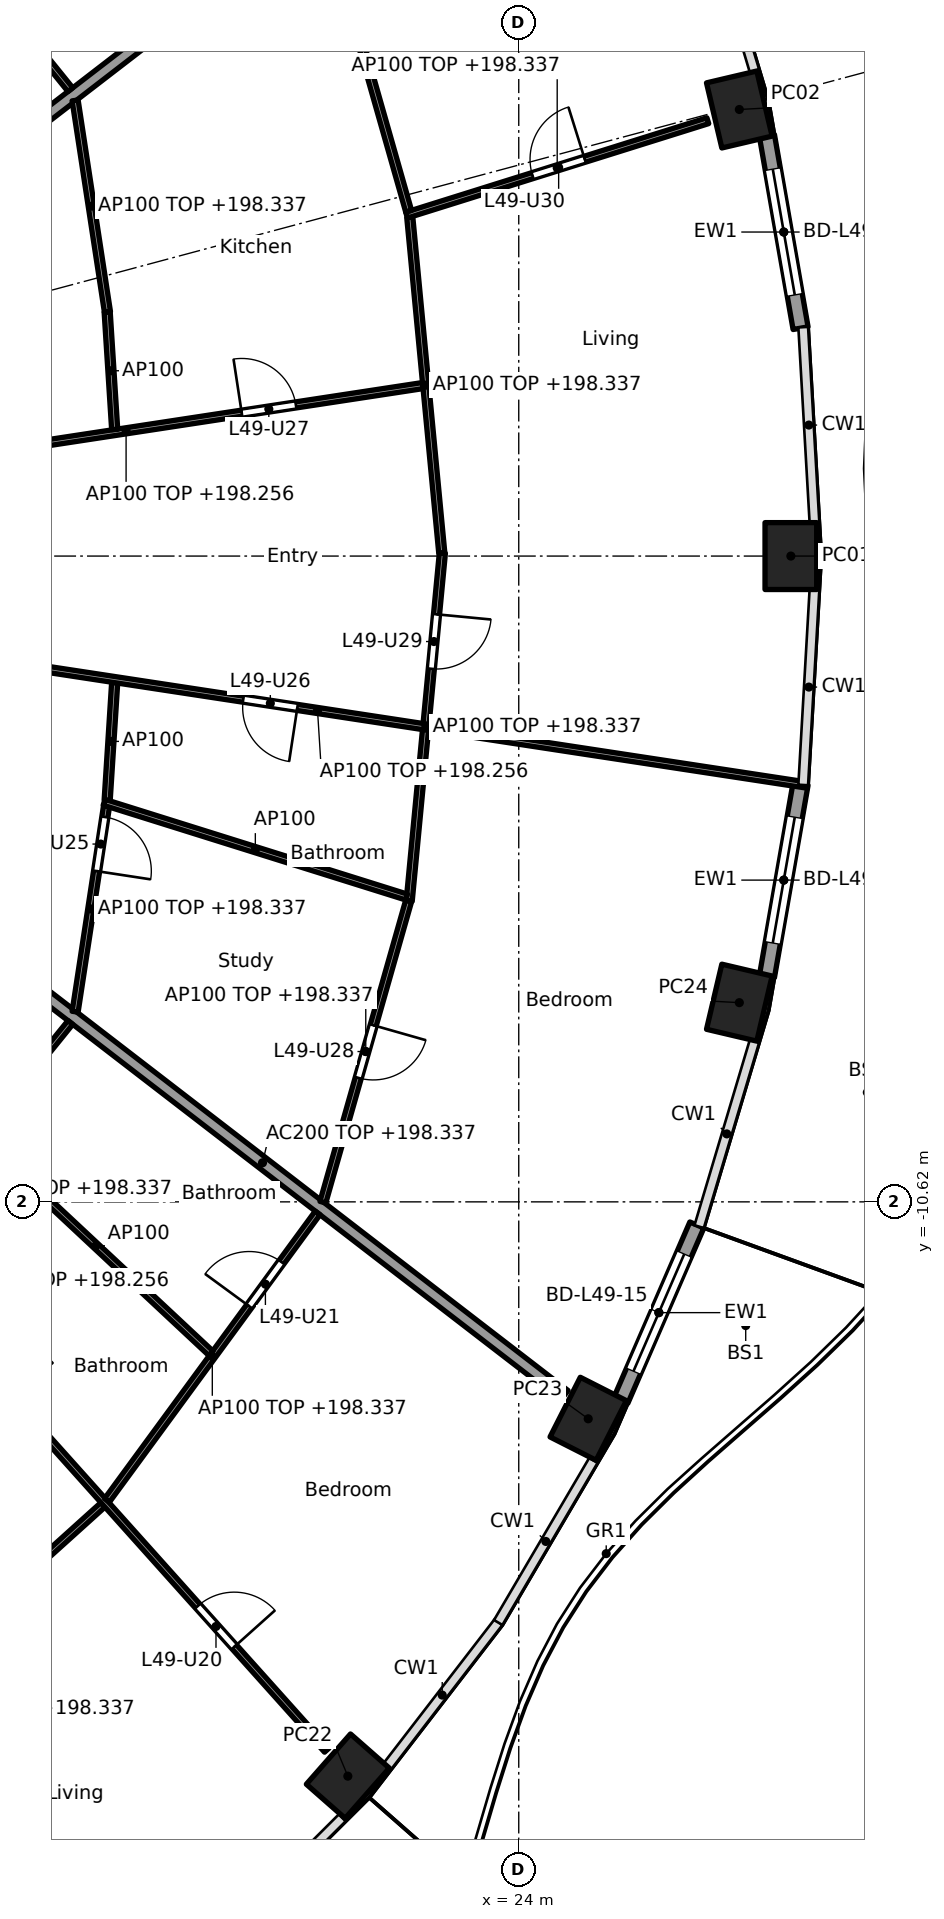
"""IFC4 building model, lengths in metres.
Left out: names, types, materials, properties, quantities, classifications, styles, units other than length and angle.
Written with IfcOpenShell. Run it as: python <this file> out.ifc"""

import sys

from ifc_helpers import new_model, si_unit, direction, frame, frame_2d, origin, origin_2d, place, context, subcontext, project, spatial, rectangle, hollow_rectangle, extrude, element, fill, save


model = new_model("IFC4")
c1 = context("Model", 3, precision=1e-05, world=origin(), true_north=direction((0.0, 1.0)))
c2 = subcontext(c1, "Body", "Model", "MODEL_VIEW")
j1 = project(units=[si_unit("LENGTHUNIT", "METRE"), si_unit("PLANEANGLEUNIT", "RADIAN")], contexts=[c1])
p1 = place(None, origin())
s1 = spatial("IfcSite", under=j1, at=p1, CompositionType="ELEMENT")
p2 = place(p1, origin())
s2 = spatial("IfcBuilding", under=s1, at=p2, CompositionType="ELEMENT")
p3 = place(p2, frame((0.0, 0.0, 195.5)))
s3 = spatial("IfcBuildingStorey", under=s2, at=p3, CompositionType="ELEMENT", Elevation=195.5)
for number, where, z_axis, x_axis in (
    (1, (28.475, 0.0, 0.0), (0.0, 0.0, 1.0), (0.0, 1.0, 0.0)),
    (2, (27.627, 7.344, 0.0), (0.0, 0.0, 1.0), (-0.229, 0.973, 0.0)),
    (3, (21.189, -20.064, 0.0), (0.0, 0.0, 1.0), (0.66, 0.751, 0.0)),
    (4, (25.142, -14.188, 0.0), (0.0, 0.0, 1.0), (0.452, 0.892, 0.0)),
    (5, (27.627, -7.344, 0.0), (0.0, 0.0, 1.0), (0.229, 0.973, 0.0)),
):
    element("IfcColumn", number, at=place(p3, frame(where, z_axis=z_axis, x_axis=x_axis)), inside=s3, PredefinedType="COLUMN", context=c2, shape_type="SweptSolid", body=[
        extrude(hollow_rectangle(XDim=1.1, YDim=0.85, WallThickness=0.036, at=origin_2d()), origin(), (0.0, 0.0, 1.0), 3.7),
    ])
p4 = place(p3, frame((28.082, 6.91, 0.0), z_axis=(0.0, 0.0, 1.0), x_axis=(0.172149769468, -0.985070787747, 0.0)))
e6 = element("IfcWall", 6, at=p4, inside=s3, PredefinedType="SOLIDWALL", context=c2, shape_type="SweptSolid", body=[
    extrude(rectangle(XDim=3.211, YDim=0.25, at=frame_2d((1.605, 0.0))), origin(), (0.0, 0.0, 1.0), 3.44),
])
p5 = place(p4, frame((0.555, 0.0, 0.0)))
e7 = element("IfcOpeningElement", 7, at=p5, cuts=e6, PredefinedType="OPENING", context=c2, shape_type="SweptSolid", body=[
    extrude(rectangle(XDim=2.1, YDim=2.4, at=frame_2d((1.05, 1.2))), frame((0.0, 0.135, 0.0), z_axis=(0.0, -1.0, 0.0), x_axis=(1.0, 0.0, 0.0)), (0.0, 0.0, 1.0), 0.27),
])
p6 = place(p3, frame((26.929, -11.0, 0.0), z_axis=(0.0, 0.0, 1.0), x_axis=(-0.397620521824, -0.917549955384, 0.0)))
e8 = element("IfcWall", 8, at=p6, inside=s3, PredefinedType="SOLIDWALL", context=c2, shape_type="SweptSolid", body=[
    extrude(rectangle(XDim=3.142, YDim=0.25, at=frame_2d((1.571, 0.0))), origin(), (0.0, 0.0, 1.0), 3.44),
])
p7 = place(p6, frame((0.521, 0.0, 0.0)))
e9 = element("IfcOpeningElement", 9, at=p7, cuts=e8, PredefinedType="OPENING", context=c2, shape_type="SweptSolid", body=[
    extrude(rectangle(XDim=2.1, YDim=2.4, at=frame_2d((1.05, 1.2))), frame((0.0, 0.135, 0.0), z_axis=(0.0, -1.0, 0.0), x_axis=(1.0, 0.0, 0.0)), (0.0, 0.0, 1.0), 0.27),
])
p8 = place(p3, frame((28.635, -3.747, 0.0), z_axis=(0.0, 0.0, 1.0), x_axis=(-0.172149769468, -0.985070787747, 0.0)))
e10 = element("IfcWall", 10, at=p8, inside=s3, PredefinedType="SOLIDWALL", context=c2, shape_type="SweptSolid", body=[
    extrude(rectangle(XDim=3.211, YDim=0.25, at=frame_2d((1.605, 0.0))), origin(), (0.0, 0.0, 1.0), 3.44),
])
p9 = place(p8, frame((0.555, 0.0, 0.0)))
e11 = element("IfcOpeningElement", 11, at=p9, cuts=e10, PredefinedType="OPENING", context=c2, shape_type="SweptSolid", body=[
    extrude(rectangle(XDim=2.1, YDim=2.4, at=frame_2d((1.05, 1.2))), frame((0.0, 0.135, 0.0), z_axis=(0.0, -1.0, 0.0), x_axis=(1.0, 0.0, 0.0)), (0.0, 0.0, 1.0), 0.27),
])
for number, where, z_axis, x_axis in (
    (12, (14.822, 6.154, 0.0), (0.0, 0.0, 1.0), (0.792, 0.61, 0.0)),
    (13, (14.822, -6.154, 0.0), (0.0, 0.0, 1.0), (0.792, -0.61, 0.0)),
):
    element("IfcWall", number, at=place(p3, frame(where, z_axis=z_axis, x_axis=x_axis)), inside=s3, PredefinedType="PARTITIONING", context=c2, shape_type="SweptSolid", body=[
        extrude(rectangle(XDim=12.533, YDim=0.2, at=frame_2d((6.266, 0.0))), origin(), (0.0, 0.0, 1.0), 2.837),
    ])
p10 = place(p3, frame((22.734, 0.05, 0.0), z_axis=(0.0, 0.0, 1.0), x_axis=(-0.094923312677, 0.995484587882, 0.0)))
e14 = element("IfcWall", 14, at=p10, inside=s3, PredefinedType="PARTITIONING", context=c2, shape_type="SweptSolid", body=[
    extrude(rectangle(XDim=5.548, YDim=0.1, at=frame_2d((2.774, 0.0))), origin(), (0.0, 0.0, 1.0), 2.837),
])
p11 = place(p3, frame((22.744, 0.05, 0.0), z_axis=(0.0, 0.0, 1.0), x_axis=(-0.094931362305, -0.995483820286, 0.0)))
e15 = element("IfcWall", 15, at=p11, inside=s3, PredefinedType="PARTITIONING", context=c2, shape_type="SweptSolid", body=[
    extrude(rectangle(XDim=5.748, YDim=0.1, at=frame_2d((2.874, 0.0))), origin(), (0.0, 0.0, 1.0), 2.837),
])
p12 = place(p11, frame((1.012, 0.0, 0.0)))
e16 = element("IfcOpeningElement", 16, at=p12, cuts=e15, PredefinedType="OPENING", context=c2, shape_type="SweptSolid", body=[
    extrude(rectangle(XDim=0.9, YDim=2.1, at=frame_2d((0.45, 1.05))), frame((0.0, 0.06, 0.0), z_axis=(0.0, -1.0, 0.0), x_axis=(1.0, 0.0, 0.0)), (0.0, 0.0, 1.0), 0.12),
])
p13 = place(p3, frame((12.664, 1.316, 0.0), z_axis=(0.0, 0.0, 1.0), x_axis=(0.988579217853, 0.150702123505, 0.0)))
e17 = element("IfcWall", 17, at=p13, inside=s3, PredefinedType="PARTITIONING", context=c2, shape_type="SweptSolid", body=[
    extrude(rectangle(XDim=9.871, YDim=0.1, at=frame_2d((4.936, 0.0))), origin(), (0.0, 0.0, 1.0), 2.756),
])
p14 = place(p13, frame((1.924, 0.0, 0.0)))
e18 = element("IfcOpeningElement", 18, at=p14, cuts=e17, PredefinedType="OPENING", context=c2, shape_type="SweptSolid", body=[
    extrude(rectangle(XDim=0.9, YDim=2.1, at=frame_2d((0.45, 1.05))), frame((0.0, 0.06, 0.0), z_axis=(0.0, -1.0, 0.0), x_axis=(1.0, 0.0, 0.0)), (0.0, 0.0, 1.0), 0.12),
])
p15 = place(p13, frame((6.86, 0.0, 0.0)))
e19 = element("IfcOpeningElement", 19, at=p15, cuts=e17, PredefinedType="OPENING", context=c2, shape_type="SweptSolid", body=[
    extrude(rectangle(XDim=0.9, YDim=2.1, at=frame_2d((0.45, 1.05))), frame((0.0, 0.06, 0.0), z_axis=(0.0, -1.0, 0.0), x_axis=(1.0, 0.0, 0.0)), (0.0, 0.0, 1.0), 0.12),
])
p16 = place(p3, frame((17.355, 2.082, 0.0), z_axis=(0.0, 0.0, 1.0), x_axis=(-0.063689464349, 0.997969765139, 0.0)))
e20 = element("IfcWall", 20, at=p16, inside=s3, PredefinedType="PARTITIONING", context=c2, shape_type="SweptSolid", body=[
    extrude(rectangle(XDim=1.936, YDim=0.1, at=frame_2d((0.968, 0.0))), origin(), (0.0, 0.0, 1.0), 3.44),
])
p17 = place(p3, frame((17.236, 4.014, 0.0), z_axis=(0.0, 0.0, 1.0), x_axis=(-0.151087537093, 0.988520387314, 0.0)))
e21 = element("IfcWall", 21, at=p17, inside=s3, PredefinedType="PARTITIONING", context=c2, shape_type="SweptSolid", body=[
    extrude(rectangle(XDim=3.519, YDim=0.1, at=frame_2d((1.76, 0.0))), origin(), (0.0, 0.0, 1.0), 2.837),
])
p18 = place(p3, frame((22.155, 5.607, 0.0), z_axis=(0.0, 0.0, 1.0), x_axis=(0.954251251005, 0.299005936321, 0.0)))
e22 = element("IfcWall", 22, at=p18, inside=s3, PredefinedType="PARTITIONING", context=c2, shape_type="SweptSolid", body=[
    extrude(rectangle(XDim=5.191, YDim=0.1, at=frame_2d((2.596, 0.0))), origin(), (0.0, 0.0, 1.0), 2.837),
])
p19 = place(p18, frame((2.171, 0.0, 0.0)))
e23 = element("IfcOpeningElement", 23, at=p19, cuts=e22, PredefinedType="OPENING", context=c2, shape_type="SweptSolid", body=[
    extrude(rectangle(XDim=0.9, YDim=2.1, at=frame_2d((0.45, 1.05))), frame((0.0, 0.06, 0.0), z_axis=(0.0, -1.0, 0.0), x_axis=(1.0, 0.0, 0.0)), (0.0, 0.0, 1.0), 0.12),
])
p20 = place(p3, frame((22.189, 5.67, 0.0), z_axis=(0.0, 0.0, 1.0), x_axis=(-0.273819702124, 0.961781040949, 0.0)))
e24 = element("IfcWall", 24, at=p20, inside=s3, PredefinedType="PARTITIONING", context=c2, shape_type="SweptSolid", body=[
    extrude(rectangle(XDim=5.152, YDim=0.1, at=frame_2d((2.576, 0.0))), origin(), (0.0, 0.0, 1.0), 2.837),
])
p21 = place(p3, frame((16.626, 7.67, 0.0), z_axis=(0.0, 0.0, 1.0), x_axis=(-0.628764602857, 0.777595700987, 0.0)))
e25 = element("IfcWall", 25, at=p21, inside=s3, PredefinedType="PARTITIONING", context=c2, shape_type="SweptSolid", body=[
    extrude(rectangle(XDim=4.957, YDim=0.1, at=frame_2d((2.479, 0.0))), origin(), (0.0, 0.0, 1.0), 2.837),
])
p22 = place(p3, frame((13.045, -19.313, 0.0), z_axis=(0.0, 0.0, 1.0), x_axis=(0.742790086539, 0.66952437397, 0.0)))
e26 = element("IfcWall", 26, at=p22, inside=s3, PredefinedType="PARTITIONING", context=c2, shape_type="SweptSolid", body=[
    extrude(rectangle(XDim=5.542, YDim=0.1, at=frame_2d((2.771, 0.0))), origin(), (0.0, 0.0, 1.0), 2.837),
])
p23 = place(p22, frame((2.321, 0.0, 0.0)))
e27 = element("IfcOpeningElement", 27, at=p23, cuts=e26, PredefinedType="OPENING", context=c2, shape_type="SweptSolid", body=[
    extrude(rectangle(XDim=0.9, YDim=2.1, at=frame_2d((0.45, 1.05))), frame((0.0, 0.06, 0.0), z_axis=(0.0, -1.0, 0.0), x_axis=(1.0, 0.0, 0.0)), (0.0, 0.0, 1.0), 0.12),
])
p24 = place(p3, frame((10.178, -7.732, 0.0), z_axis=(0.0, 0.0, 1.0), x_axis=(0.667283629999, -0.74480370376, 0.0)))
e28 = element("IfcWall", 28, at=p24, inside=s3, PredefinedType="PARTITIONING", context=c2, shape_type="SweptSolid", body=[
    extrude(rectangle(XDim=15.983, YDim=0.1, at=frame_2d((7.992, 0.0))), origin(), (0.0, 0.0, 1.0), 2.756),
])
p25 = place(p24, frame((2.07, 0.0, 0.0)))
e29 = element("IfcOpeningElement", 29, at=p25, cuts=e28, PredefinedType="OPENING", context=c2, shape_type="SweptSolid", body=[
    extrude(rectangle(XDim=0.9, YDim=2.1, at=frame_2d((0.45, 1.05))), frame((0.0, 0.06, 0.0), z_axis=(0.0, -1.0, 0.0), x_axis=(1.0, 0.0, 0.0)), (0.0, 0.0, 1.0), 0.12),
])
p26 = place(p24, frame((7.331, 0.0, 0.0)))
e30 = element("IfcOpeningElement", 30, at=p26, cuts=e28, PredefinedType="OPENING", context=c2, shape_type="SweptSolid", body=[
    extrude(rectangle(XDim=0.9, YDim=2.1, at=frame_2d((0.45, 1.05))), frame((0.0, 0.06, 0.0), z_axis=(0.0, -1.0, 0.0), x_axis=(1.0, 0.0, 0.0)), (0.0, 0.0, 1.0), 0.12),
])
p27 = place(p24, frame((12.802, 0.0, 0.0)))
e31 = element("IfcOpeningElement", 31, at=p27, cuts=e28, PredefinedType="OPENING", context=c2, shape_type="SweptSolid", body=[
    extrude(rectangle(XDim=0.9, YDim=2.1, at=frame_2d((0.45, 1.05))), frame((0.0, 0.06, 0.0), z_axis=(0.0, -1.0, 0.0), x_axis=(1.0, 0.0, 0.0)), (0.0, 0.0, 1.0), 0.12),
])
p28 = place(p3, frame((13.572, -11.447, 0.0), z_axis=(0.0, 0.0, 1.0), x_axis=(0.628738316533, 0.777616955399, 0.0)))
e32 = element("IfcWall", 32, at=p28, inside=s3, PredefinedType="PARTITIONING", context=c2, shape_type="SweptSolid", body=[
    extrude(rectangle(XDim=4.857, YDim=0.1, at=frame_2d((2.429, 0.0))), origin(), (0.0, 0.0, 1.0), 2.837),
])
p29 = place(p3, frame((17.229, -15.529, 0.0), z_axis=(0.0, 0.0, 1.0), x_axis=(0.591110768293, 0.806590391468, 0.0)))
e33 = element("IfcWall", 33, at=p29, inside=s3, PredefinedType="PARTITIONING", context=c2, shape_type="SweptSolid", body=[
    extrude(rectangle(XDim=5.86, YDim=0.1, at=frame_2d((2.93, 0.0))), origin(), (0.0, 0.0, 1.0), 2.837),
])
p30 = place(p29, frame((3.958, 0.0, 0.0)))
e34 = element("IfcOpeningElement", 34, at=p30, cuts=e33, PredefinedType="OPENING", context=c2, shape_type="SweptSolid", body=[
    extrude(rectangle(XDim=0.9, YDim=2.1, at=frame_2d((0.45, 1.05))), frame((0.0, 0.06, 0.0), z_axis=(0.0, -1.0, 0.0), x_axis=(1.0, 0.0, 0.0)), (0.0, 0.0, 1.0), 0.12),
])
p31 = place(p3, frame((15.152, -9.573, 0.0), z_axis=(0.0, 0.0, 1.0), x_axis=(0.730723083214, -0.682673989294, 0.0)))
e35 = element("IfcWall", 35, at=p31, inside=s3, PredefinedType="PARTITIONING", context=c2, shape_type="SweptSolid", body=[
    extrude(rectangle(XDim=5.183, YDim=0.1, at=frame_2d((2.591, 0.0))), origin(), (0.0, 0.0, 1.0), 3.44),
])
p32 = place(p3, frame((16.704, -7.493, 0.0), z_axis=(0.0, 0.0, 1.0), x_axis=(0.1510806336, 0.988521442434, 0.0)))
e36 = element("IfcWall", 36, at=p32, inside=s3, PredefinedType="PARTITIONING", context=c2, shape_type="SweptSolid", body=[
    extrude(rectangle(XDim=3.419, YDim=0.1, at=frame_2d((1.71, 0.0))), origin(), (0.0, 0.0, 1.0), 2.837),
])
p33 = place(p32, frame((2.339, 0.0, 0.0)))
e37 = element("IfcOpeningElement", 37, at=p33, cuts=e36, PredefinedType="OPENING", context=c2, shape_type="SweptSolid", body=[
    extrude(rectangle(XDim=0.9, YDim=2.1, at=frame_2d((0.45, 1.05))), frame((0.0, 0.06, 0.0), z_axis=(0.0, -1.0, 0.0), x_axis=(1.0, 0.0, 0.0)), (0.0, 0.0, 1.0), 0.12),
])
p34 = place(p3, frame((20.779, -10.625, 0.0), z_axis=(0.0, 0.0, 1.0), x_axis=(0.273819702124, 0.961781040949, 0.0)))
e38 = element("IfcWall", 38, at=p34, inside=s3, PredefinedType="PARTITIONING", context=c2, shape_type="SweptSolid", body=[
    extrude(rectangle(XDim=5.152, YDim=0.1, at=frame_2d((2.576, 0.0))), origin(), (0.0, 0.0, 1.0), 2.837),
])
p35 = place(p34, frame((2.126, 0.0, 0.0)))
e39 = element("IfcOpeningElement", 39, at=p35, cuts=e38, PredefinedType="OPENING", context=c2, shape_type="SweptSolid", body=[
    extrude(rectangle(XDim=0.9, YDim=2.1, at=frame_2d((0.45, 1.05))), frame((0.0, 0.06, 0.0), z_axis=(0.0, -1.0, 0.0), x_axis=(1.0, 0.0, 0.0)), (0.0, 0.0, 1.0), 0.12),
])
p36 = place(p3, frame((17.181, -4.049, 0.0), z_axis=(0.0, 0.0, 1.0), x_axis=(0.954246359918, -0.299021545351, 0.0)))
e40 = element("IfcWall", 40, at=p36, inside=s3, PredefinedType="PARTITIONING", context=c2, shape_type="SweptSolid", body=[
    extrude(rectangle(XDim=5.213, YDim=0.1, at=frame_2d((2.606, 0.0))), origin(), (0.0, 0.0, 1.0), 3.44),
])
p37 = place(p3, frame((17.232, -4.014, 0.0), z_axis=(0.0, 0.0, 1.0), x_axis=(0.063689464349, 0.997969765139, 0.0)))
e41 = element("IfcWall", 41, at=p37, inside=s3, PredefinedType="PARTITIONING", context=c2, shape_type="SweptSolid", body=[
    extrude(rectangle(XDim=1.936, YDim=0.1, at=frame_2d((0.968, 0.0))), origin(), (0.0, 0.0, 1.0), 3.44),
])
p38 = place(p3, frame((12.664, -1.316, 0.0), z_axis=(0.0, 0.0, 1.0), x_axis=(0.988585177081, -0.150663026836, 0.0)))
e42 = element("IfcWall", 42, at=p38, inside=s3, PredefinedType="PARTITIONING", context=c2, shape_type="SweptSolid", body=[
    extrude(rectangle(XDim=16.24, YDim=0.1, at=frame_2d((8.12, 0.0))), origin(), (0.0, 0.0, 1.0), 2.756),
])
p39 = place(p38, frame((1.924, 0.0, 0.0)))
e43 = element("IfcOpeningElement", 43, at=p39, cuts=e42, PredefinedType="OPENING", context=c2, shape_type="SweptSolid", body=[
    extrude(rectangle(XDim=0.9, YDim=2.1, at=frame_2d((0.45, 1.05))), frame((0.0, 0.06, 0.0), z_axis=(0.0, -1.0, 0.0), x_axis=(1.0, 0.0, 0.0)), (0.0, 0.0, 1.0), 0.12),
])
p40 = place(p38, frame((6.885, 0.0, 0.0)))
e44 = element("IfcOpeningElement", 44, at=p40, cuts=e42, PredefinedType="OPENING", context=c2, shape_type="SweptSolid", body=[
    extrude(rectangle(XDim=0.9, YDim=2.1, at=frame_2d((0.45, 1.05))), frame((0.0, 0.06, 0.0), z_axis=(0.0, -1.0, 0.0), x_axis=(1.0, 0.0, 0.0)), (0.0, 0.0, 1.0), 0.12),
])
p41 = place(p5, origin())
e45 = element("IfcDoor", 45, at=p41, inside=s3, OperationType="SLIDING_TO_LEFT", PredefinedType="DOOR", context=c2, shape_type="SweptSolid", body=[
    extrude(rectangle(XDim=2.1, YDim=2.4, at=frame_2d((1.05, 1.2))), frame((0.0, 0.025, 0.0), z_axis=(0.0, -1.0, 0.0), x_axis=(1.0, 0.0, 0.0)), (0.0, 0.0, 1.0), 0.05),
])
fill(e7, e45)
p42 = place(p7, origin())
e46 = element("IfcDoor", 46, at=p42, inside=s3, OperationType="SLIDING_TO_LEFT", PredefinedType="DOOR", context=c2, shape_type="SweptSolid", body=[
    extrude(rectangle(XDim=2.1, YDim=2.4, at=frame_2d((1.05, 1.2))), frame((0.0, 0.025, 0.0), z_axis=(0.0, -1.0, 0.0), x_axis=(1.0, 0.0, 0.0)), (0.0, 0.0, 1.0), 0.05),
])
fill(e9, e46)
p43 = place(p9, origin())
e47 = element("IfcDoor", 47, at=p43, inside=s3, OperationType="SLIDING_TO_LEFT", PredefinedType="DOOR", context=c2, shape_type="SweptSolid", body=[
    extrude(rectangle(XDim=2.1, YDim=2.4, at=frame_2d((1.05, 1.2))), frame((0.0, 0.025, 0.0), z_axis=(0.0, -1.0, 0.0), x_axis=(1.0, 0.0, 0.0)), (0.0, 0.0, 1.0), 0.05),
])
fill(e11, e47)
p44 = place(p27, origin())
e48 = element("IfcDoor", 48, at=p44, inside=s3, OperationType="SINGLE_SWING_RIGHT", PredefinedType="DOOR", context=c2, shape_type="SweptSolid", body=[
    extrude(rectangle(XDim=0.9, YDim=2.1, at=frame_2d((0.45, 1.05))), frame((0.0, 0.025, 0.0), z_axis=(0.0, -1.0, 0.0), x_axis=(1.0, 0.0, 0.0)), (0.0, 0.0, 1.0), 0.05),
])
fill(e31, e48)
p45 = place(p30, origin())
e49 = element("IfcDoor", 49, at=p45, inside=s3, OperationType="SINGLE_SWING_LEFT", PredefinedType="DOOR", context=c2, shape_type="SweptSolid", body=[
    extrude(rectangle(XDim=0.9, YDim=2.1, at=frame_2d((0.45, 1.05))), frame((0.0, 0.025, 0.0), z_axis=(0.0, -1.0, 0.0), x_axis=(1.0, 0.0, 0.0)), (0.0, 0.0, 1.0), 0.05),
])
fill(e34, e49)
p46 = place(p33, frame((0.9, 0.0, 0.0), x_axis=(-1.0, 0.0, 0.0)))
e50 = element("IfcDoor", 50, at=p46, inside=s3, OperationType="SINGLE_SWING_RIGHT", PredefinedType="DOOR", context=c2, shape_type="SweptSolid", body=[
    extrude(rectangle(XDim=0.9, YDim=2.1, at=frame_2d((0.45, 1.05))), frame((0.0, 0.025, 0.0), z_axis=(0.0, -1.0, 0.0), x_axis=(1.0, 0.0, 0.0)), (0.0, 0.0, 1.0), 0.05),
])
fill(e37, e50)
p47 = place(p40, frame((0.9, 0.0, 0.0), x_axis=(-1.0, 0.0, 0.0)))
e51 = element("IfcDoor", 51, at=p47, inside=s3, OperationType="SINGLE_SWING_LEFT", PredefinedType="DOOR", context=c2, shape_type="SweptSolid", body=[
    extrude(rectangle(XDim=0.9, YDim=2.1, at=frame_2d((0.45, 1.05))), frame((0.0, 0.025, 0.0), z_axis=(0.0, -1.0, 0.0), x_axis=(1.0, 0.0, 0.0)), (0.0, 0.0, 1.0), 0.05),
])
fill(e44, e51)
p48 = place(p15, origin())
e52 = element("IfcDoor", 52, at=p48, inside=s3, OperationType="SINGLE_SWING_LEFT", PredefinedType="DOOR", context=c2, shape_type="SweptSolid", body=[
    extrude(rectangle(XDim=0.9, YDim=2.1, at=frame_2d((0.45, 1.05))), frame((0.0, 0.025, 0.0), z_axis=(0.0, -1.0, 0.0), x_axis=(1.0, 0.0, 0.0)), (0.0, 0.0, 1.0), 0.05),
])
fill(e19, e52)
p49 = place(p35, frame((0.9, 0.0, 0.0), x_axis=(-1.0, 0.0, 0.0)))
e53 = element("IfcDoor", 53, at=p49, inside=s3, OperationType="SINGLE_SWING_LEFT", PredefinedType="DOOR", context=c2, shape_type="SweptSolid", body=[
    extrude(rectangle(XDim=0.9, YDim=2.1, at=frame_2d((0.45, 1.05))), frame((0.0, 0.025, 0.0), z_axis=(0.0, -1.0, 0.0), x_axis=(1.0, 0.0, 0.0)), (0.0, 0.0, 1.0), 0.05),
])
fill(e39, e53)
p50 = place(p12, origin())
e54 = element("IfcDoor", 54, at=p50, inside=s3, OperationType="SINGLE_SWING_LEFT", PredefinedType="DOOR", context=c2, shape_type="SweptSolid", body=[
    extrude(rectangle(XDim=0.9, YDim=2.1, at=frame_2d((0.45, 1.05))), frame((0.0, 0.025, 0.0), z_axis=(0.0, -1.0, 0.0), x_axis=(1.0, 0.0, 0.0)), (0.0, 0.0, 1.0), 0.05),
])
fill(e16, e54)
p51 = place(p19, origin())
e55 = element("IfcDoor", 55, at=p51, inside=s3, OperationType="SINGLE_SWING_RIGHT", PredefinedType="DOOR", context=c2, shape_type="SweptSolid", body=[
    extrude(rectangle(XDim=0.9, YDim=2.1, at=frame_2d((0.45, 1.05))), frame((0.0, 0.025, 0.0), z_axis=(0.0, -1.0, 0.0), x_axis=(1.0, 0.0, 0.0)), (0.0, 0.0, 1.0), 0.05),
])
fill(e23, e55)
save(model, sys.argv[1])
